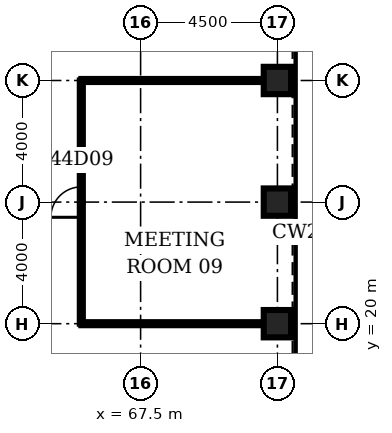
"""IFC4 building model, lengths in metres.
Left out: names, types, materials, properties, quantities, classifications, styles, units other than length and angle.
Written with IfcOpenShell. Run it as: python <this file> out.ifc"""

import sys

from ifc_helpers import new_model, si_unit, direction, frame, frame_2d, origin, origin_2d, place, context, subcontext, project, spatial, rectangle, hollow_rectangle, extrude, element, fill, save


model = new_model("IFC4")
c1 = context("Model", 3, precision=1e-05, world=origin(), true_north=direction((0.0, 1.0)))
c2 = subcontext(c1, "Body", "Model", "MODEL_VIEW")
j1 = project(units=[si_unit("LENGTHUNIT", "METRE"), si_unit("PLANEANGLEUNIT", "RADIAN")], contexts=[c1])
p1 = place(None, origin())
s1 = spatial("IfcSite", under=j1, at=p1, CompositionType="ELEMENT")
p2 = place(p1, origin())
s2 = spatial("IfcBuilding", under=s1, at=p2, CompositionType="ELEMENT")
p3 = place(p2, frame((0.0, 0.0, 198.4)))
s3 = spatial("IfcBuildingStorey", under=s2, at=p3, CompositionType="ELEMENT", Elevation=198.4)
for number, where, z_axis, x_axis in (
    (1, (72.0, 20.0, 0.0), (0.0, 0.0, 1.0), (1.0, 0.0, 0.0)),
    (2, (72.0, 24.0, 0.0), (0.0, 0.0, 1.0), (1.0, 0.0, 0.0)),
    (3, (72.0, 28.0, 0.0), (0.0, 0.0, 1.0), (1.0, 0.0, 0.0)),
):
    element("IfcColumn", number, at=place(p3, frame(where, z_axis=z_axis, x_axis=x_axis)), inside=s3, PredefinedType="COLUMN", context=c2, shape_type="SweptSolid", body=[
        extrude(hollow_rectangle(XDim=0.9, YDim=0.9, WallThickness=0.09, at=origin_2d()), origin(), (0.0, 0.0, 1.0), 4.2),
    ])
for number, where, z_axis, x_axis in (
    (4, (65.55, 20.0, 0.0), (0.0, 0.0, 1.0), (1.0, 0.0, 0.0)),
    (5, (65.55, 28.0, 0.0), (0.0, 0.0, 1.0), (1.0, 0.0, 0.0)),
):
    element("IfcWall", number, at=place(p3, frame(where, z_axis=z_axis, x_axis=x_axis)), inside=s3, PredefinedType="PARTITIONING", context=c2, shape_type="SweptSolid", body=[
        extrude(rectangle(XDim=6.0, YDim=0.1, at=frame_2d((3.0, 0.0))), origin(), (0.0, 0.0, 1.0), 3.0),
    ])
p4 = place(p3, frame((65.55, 20.0, 0.0), z_axis=(0.0, 0.0, 1.0), x_axis=(0.0, 1.0, 0.0)))
e6 = element("IfcWall", 6, at=p4, inside=s3, PredefinedType="PARTITIONING", context=c2, shape_type="SweptSolid", body=[
    extrude(rectangle(XDim=8.0, YDim=0.1, at=frame_2d((4.0, 0.0))), origin(), (0.0, 0.0, 1.0), 3.0),
])
p5 = place(p4, frame((3.5, 0.0, 0.0)))
e7 = element("IfcOpeningElement", 7, at=p5, cuts=e6, PredefinedType="OPENING", context=c2, shape_type="SweptSolid", body=[
    extrude(rectangle(XDim=1.0, YDim=2.1, at=frame_2d((0.5, 1.05))), frame((0.0, 0.06, 0.0), z_axis=(0.0, -1.0, 0.0), x_axis=(1.0, 0.0, 0.0)), (0.0, 0.0, 1.0), 0.12),
])
p6 = place(p5, origin())
e8 = element("IfcDoor", 8, at=p6, inside=s3, OperationType="SINGLE_SWING_LEFT", PredefinedType="DOOR", context=c2, shape_type="SweptSolid", body=[
    extrude(rectangle(XDim=1.0, YDim=2.1, at=frame_2d((0.5, 1.05))), frame((0.0, 0.025, 0.0), z_axis=(0.0, -1.0, 0.0), x_axis=(1.0, 0.0, 0.0)), (0.0, 0.0, 1.0), 0.05),
])
fill(e7, e8)
save(model, sys.argv[1])
